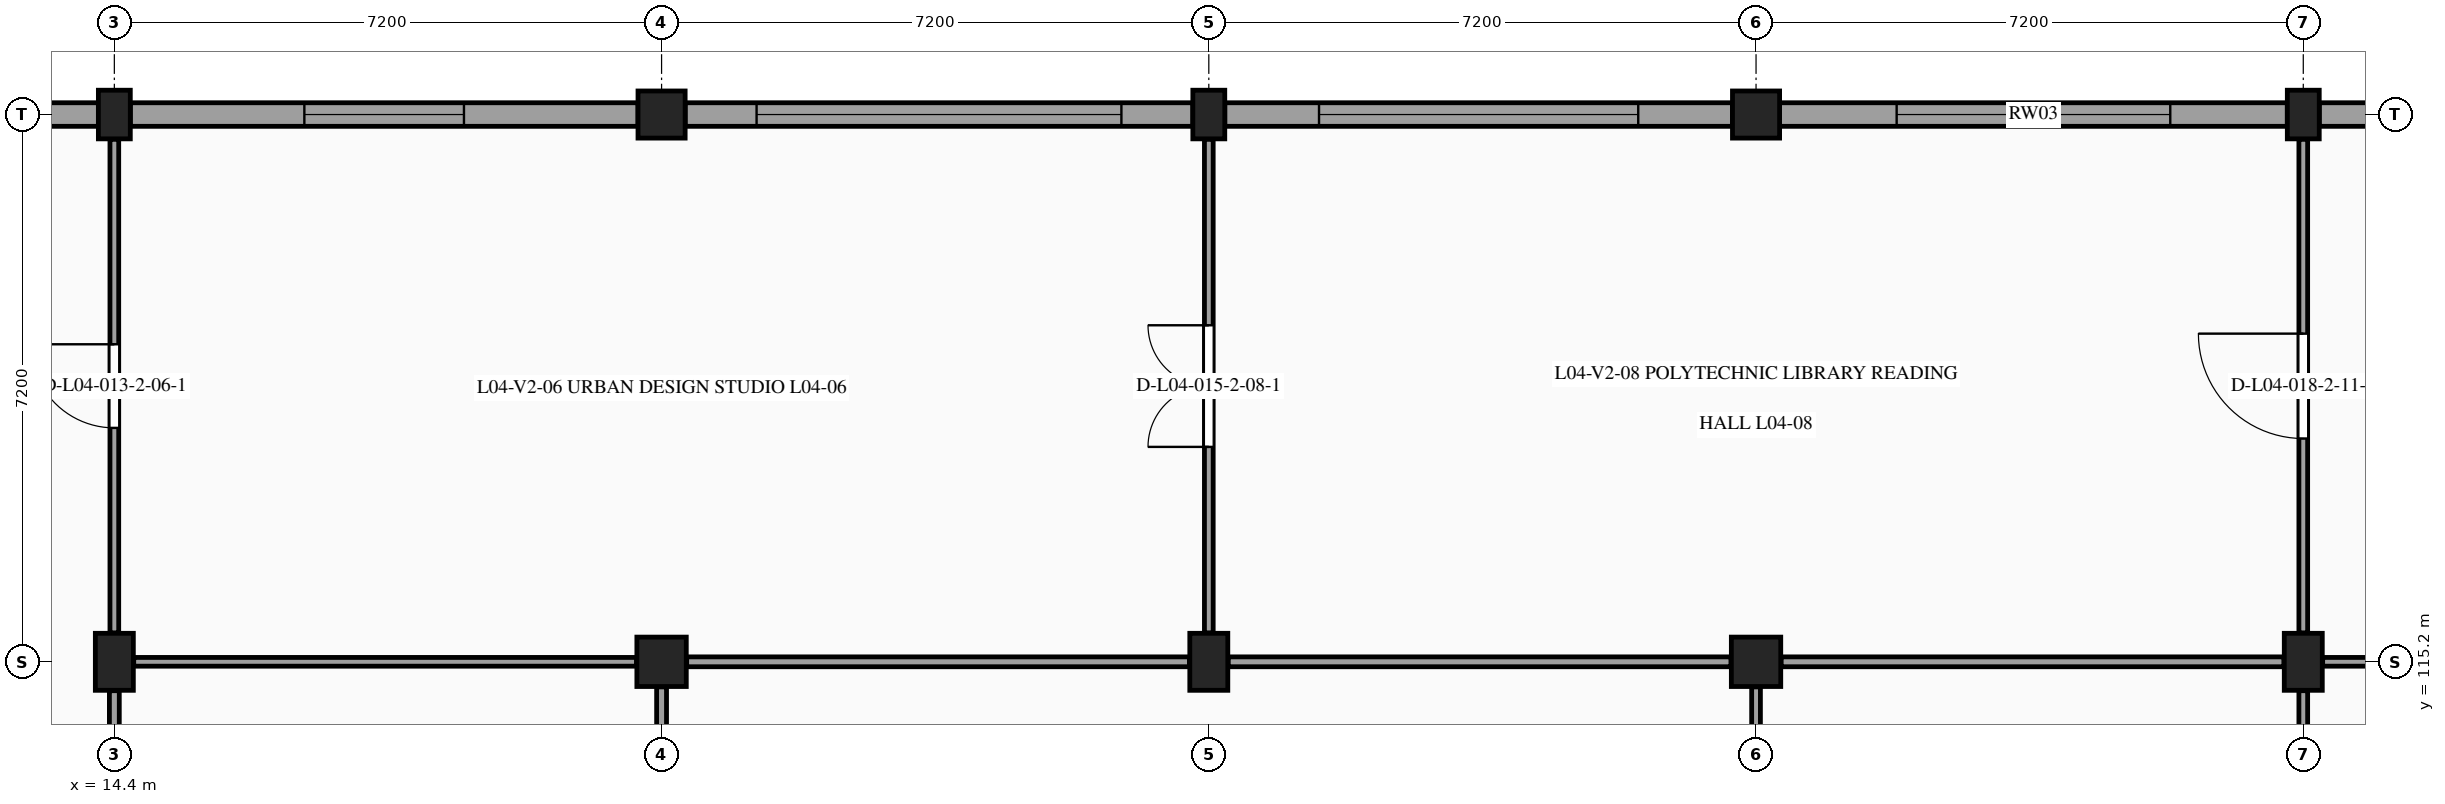
"""IFC4 building model, lengths in metres.
Left out: names, types, materials, properties, quantities, classifications, styles, units other than length and angle.
Written with IfcOpenShell. Run it as: python <this file> out.ifc"""

import sys

from ifc_helpers import new_model, si_unit, direction, frame, frame_2d, origin, origin_2d, place, context, subcontext, project, spatial, rectangle, extrude, element, fill, save


model = new_model("IFC4")
c1 = context("Model", 3, precision=1e-05, world=origin(), true_north=direction((0.0, 1.0)))
c2 = subcontext(c1, "Body", "Model", "MODEL_VIEW")
j1 = project(units=[si_unit("LENGTHUNIT", "METRE"), si_unit("PLANEANGLEUNIT", "RADIAN")], contexts=[c1])
p1 = place(None, origin())
s1 = spatial("IfcSite", under=j1, at=p1, CompositionType="ELEMENT")
p2 = place(p1, origin())
s2 = spatial("IfcBuilding", under=s1, at=p2, CompositionType="ELEMENT")
p3 = place(p2, frame((0.0, 0.0, 18.6)))
s3 = spatial("IfcBuildingStorey", under=s2, at=p3, CompositionType="ELEMENT", Elevation=18.6)
p4 = place(p3, frame((14.4, 115.2, 0.0), z_axis=(0.0, 0.0, 1.0), x_axis=(1.0, 0.0, 0.0)))
e1 = element("IfcColumn", 1, at=p4, inside=s3, PredefinedType="COLUMN", context=c2, shape_type="SweptSolid", body=[
    extrude(rectangle(XDim=0.5, YDim=0.75, at=origin_2d()), origin(), (0.0, 0.0, 1.0), 4.2),
])
p5 = place(p3, frame((14.4, 122.4, 0.0), z_axis=(0.0, 0.0, 1.0), x_axis=(1.0, 0.0, 0.0)))
e2 = element("IfcColumn", 2, at=p5, inside=s3, PredefinedType="PILASTER", context=c2, shape_type="SweptSolid", body=[
    extrude(rectangle(XDim=0.42, YDim=0.64, at=origin_2d()), origin(), (0.0, 0.0, 1.0), 4.2),
])
p6 = place(p3, frame((21.6, 115.2, 0.0), z_axis=(0.0, 0.0, 1.0), x_axis=(1.0, 0.0, 0.0)))
e3 = element("IfcColumn", 3, at=p6, inside=s3, PredefinedType="COLUMN", context=c2, shape_type="SweptSolid", body=[
    extrude(rectangle(XDim=0.65, YDim=0.65, at=origin_2d()), origin(), (0.0, 0.0, 1.0), 4.2),
])
p7 = place(p3, frame((21.6, 122.4, 0.0), z_axis=(0.0, 0.0, 1.0), x_axis=(1.0, 0.0, 0.0)))
e4 = element("IfcColumn", 4, at=p7, inside=s3, PredefinedType="COLUMN", context=c2, shape_type="SweptSolid", body=[
    extrude(rectangle(XDim=0.62, YDim=0.62, at=origin_2d()), origin(), (0.0, 0.0, 1.0), 4.2),
])
p8 = place(p3, frame((28.8, 115.2, 0.0), z_axis=(0.0, 0.0, 1.0), x_axis=(1.0, 0.0, 0.0)))
e5 = element("IfcColumn", 5, at=p8, inside=s3, PredefinedType="COLUMN", context=c2, shape_type="SweptSolid", body=[
    extrude(rectangle(XDim=0.5, YDim=0.75, at=origin_2d()), origin(), (0.0, 0.0, 1.0), 4.2),
])
p9 = place(p3, frame((28.8, 122.4, 0.0), z_axis=(0.0, 0.0, 1.0), x_axis=(1.0, 0.0, 0.0)))
e6 = element("IfcColumn", 6, at=p9, inside=s3, PredefinedType="PILASTER", context=c2, shape_type="SweptSolid", body=[
    extrude(rectangle(XDim=0.42, YDim=0.64, at=origin_2d()), origin(), (0.0, 0.0, 1.0), 4.2),
])
p10 = place(p3, frame((36.0, 115.2, 0.0), z_axis=(0.0, 0.0, 1.0), x_axis=(1.0, 0.0, 0.0)))
e7 = element("IfcColumn", 7, at=p10, inside=s3, PredefinedType="COLUMN", context=c2, shape_type="SweptSolid", body=[
    extrude(rectangle(XDim=0.65, YDim=0.65, at=origin_2d()), origin(), (0.0, 0.0, 1.0), 4.2),
])
p11 = place(p3, frame((36.0, 122.4, 0.0), z_axis=(0.0, 0.0, 1.0), x_axis=(1.0, 0.0, 0.0)))
e8 = element("IfcColumn", 8, at=p11, inside=s3, PredefinedType="COLUMN", context=c2, shape_type="SweptSolid", body=[
    extrude(rectangle(XDim=0.62, YDim=0.62, at=origin_2d()), origin(), (0.0, 0.0, 1.0), 4.2),
])
p12 = place(p3, frame((43.2, 115.2, 0.0), z_axis=(0.0, 0.0, 1.0), x_axis=(1.0, 0.0, 0.0)))
e9 = element("IfcColumn", 9, at=p12, inside=s3, PredefinedType="COLUMN", context=c2, shape_type="SweptSolid", body=[
    extrude(rectangle(XDim=0.5, YDim=0.75, at=origin_2d()), origin(), (0.0, 0.0, 1.0), 4.2),
])
p13 = place(p3, frame((43.2, 122.4, 0.0), z_axis=(0.0, 0.0, 1.0), x_axis=(1.0, 0.0, 0.0)))
e10 = element("IfcColumn", 10, at=p13, inside=s3, PredefinedType="PILASTER", context=c2, shape_type="SweptSolid", body=[
    extrude(rectangle(XDim=0.42, YDim=0.64, at=origin_2d()), origin(), (0.0, 0.0, 1.0), 4.2),
])
p14 = place(p3, frame((7.51, 122.4, 0.0), z_axis=(0.0, 0.0, 1.0), x_axis=(1.0, 0.0, 0.0)))
e11 = element("IfcWall", 11, at=p14, inside=s3, PredefinedType="STANDARD", context=c2, shape_type="SweptSolid", body=[
    extrude(rectangle(XDim=6.68, YDim=0.31, at=frame_2d((3.34, 0.0))), origin(), (0.0, 0.0, 1.0), 3.2),
])
p15 = place(p14, frame((2.09, 0.0, 0.98)))
e12 = element("IfcOpeningElement", 12, at=p15, cuts=e11, PredefinedType="OPENING", context=c2, shape_type="SweptSolid", body=[
    extrude(rectangle(XDim=2.5, YDim=1.35, at=frame_2d((1.25, 0.675))), frame((0.0, 0.165, 0.0), z_axis=(0.0, -1.0, 0.0), x_axis=(1.0, 0.0, 0.0)), (0.0, 0.0, 1.0), 0.33),
])
p16 = place(p3, frame((14.61, 122.4, 0.0), z_axis=(0.0, 0.0, 1.0), x_axis=(1.0, 0.0, 0.0)))
e13 = element("IfcWall", 13, at=p16, inside=s3, PredefinedType="STANDARD", context=c2, shape_type="SweptSolid", body=[
    extrude(rectangle(XDim=6.68, YDim=0.31, at=frame_2d((3.34, 0.0))), origin(), (0.0, 0.0, 1.0), 3.2),
])
p17 = place(p16, frame((2.29, 0.0, 0.98)))
e14 = element("IfcOpeningElement", 14, at=p17, cuts=e13, PredefinedType="OPENING", context=c2, shape_type="SweptSolid", body=[
    extrude(rectangle(XDim=2.1, YDim=1.3, at=frame_2d((1.05, 0.65))), frame((0.0, 0.165, 0.0), z_axis=(0.0, -1.0, 0.0), x_axis=(1.0, 0.0, 0.0)), (0.0, 0.0, 1.0), 0.33),
])
p18 = place(p3, frame((21.91, 122.4, 0.0), z_axis=(0.0, 0.0, 1.0), x_axis=(1.0, 0.0, 0.0)))
e15 = element("IfcWall", 15, at=p18, inside=s3, PredefinedType="STANDARD", context=c2, shape_type="SweptSolid", body=[
    extrude(rectangle(XDim=6.68, YDim=0.31, at=frame_2d((3.34, 0.0))), origin(), (0.0, 0.0, 1.0), 3.2),
])
p19 = place(p18, frame((0.94, 0.0, 0.98)))
e16 = element("IfcOpeningElement", 16, at=p19, cuts=e15, PredefinedType="OPENING", context=c2, shape_type="SweptSolid", body=[
    extrude(rectangle(XDim=4.8, YDim=1.5, at=frame_2d((2.4, 0.75))), frame((0.0, 0.165, 0.0), z_axis=(0.0, -1.0, 0.0), x_axis=(1.0, 0.0, 0.0)), (0.0, 0.0, 1.0), 0.33),
])
p20 = place(p3, frame((29.01, 122.4, 0.0), z_axis=(0.0, 0.0, 1.0), x_axis=(1.0, 0.0, 0.0)))
e17 = element("IfcWall", 17, at=p20, inside=s3, PredefinedType="STANDARD", context=c2, shape_type="SweptSolid", body=[
    extrude(rectangle(XDim=6.68, YDim=0.31, at=frame_2d((3.34, 0.0))), origin(), (0.0, 0.0, 1.0), 3.2),
])
p21 = place(p20, frame((1.24, 0.0, 0.98)))
e18 = element("IfcOpeningElement", 18, at=p21, cuts=e17, PredefinedType="OPENING", context=c2, shape_type="SweptSolid", body=[
    extrude(rectangle(XDim=4.2, YDim=1.5, at=frame_2d((2.1, 0.75))), frame((0.0, 0.165, 0.0), z_axis=(0.0, -1.0, 0.0), x_axis=(1.0, 0.0, 0.0)), (0.0, 0.0, 1.0), 0.33),
])
p22 = place(p3, frame((36.31, 122.4, 0.0), z_axis=(0.0, 0.0, 1.0), x_axis=(1.0, 0.0, 0.0)))
e19 = element("IfcWall", 19, at=p22, inside=s3, PredefinedType="STANDARD", context=c2, shape_type="SweptSolid", body=[
    extrude(rectangle(XDim=6.68, YDim=0.31, at=frame_2d((3.34, 0.0))), origin(), (0.0, 0.0, 1.0), 3.2),
])
p23 = place(p22, frame((1.54, 0.0, 0.98)))
e20 = element("IfcOpeningElement", 20, at=p23, cuts=e19, PredefinedType="OPENING", context=c2, shape_type="SweptSolid", body=[
    extrude(rectangle(XDim=3.6, YDim=1.5, at=frame_2d((1.8, 0.75))), frame((0.0, 0.165, 0.0), z_axis=(0.0, -1.0, 0.0), x_axis=(1.0, 0.0, 0.0)), (0.0, 0.0, 1.0), 0.33),
])
p24 = place(p3, frame((43.41, 122.4, 0.0), z_axis=(0.0, 0.0, 1.0), x_axis=(1.0, 0.0, 0.0)))
e21 = element("IfcWall", 21, at=p24, inside=s3, PredefinedType="STANDARD", context=c2, shape_type="SweptSolid", body=[
    extrude(rectangle(XDim=6.68, YDim=0.31, at=frame_2d((3.34, 0.0))), origin(), (0.0, 0.0, 1.0), 3.2),
])
p25 = place(p24, frame((1.74, 0.0, 0.98)))
e22 = element("IfcOpeningElement", 22, at=p25, cuts=e21, PredefinedType="OPENING", context=c2, shape_type="SweptSolid", body=[
    extrude(rectangle(XDim=3.2, YDim=1.45, at=frame_2d((1.6, 0.725))), frame((0.0, 0.165, 0.0), z_axis=(0.0, -1.0, 0.0), x_axis=(1.0, 0.0, 0.0)), (0.0, 0.0, 1.0), 0.33),
])
p26 = place(p3, frame((14.4, 108.305, 0.0), z_axis=(0.0, 0.0, 1.0), x_axis=(0.0, 1.0, 0.0)))
e23 = element("IfcWall", 23, at=p26, inside=s3, PredefinedType="PARTITIONING", context=c2, shape_type="SweptSolid", body=[
    extrude(rectangle(XDim=6.515, YDim=0.13, at=frame_2d((3.258, 0.0))), origin(), (0.0, 0.0, 1.0), 3.26),
])
p27 = place(p3, frame((14.4, 115.58, 0.0), z_axis=(0.0, 0.0, 1.0), x_axis=(0.0, 1.0, 0.0)))
e24 = element("IfcWall", 24, at=p27, inside=s3, PredefinedType="PARTITIONING", context=c2, shape_type="SweptSolid", body=[
    extrude(rectangle(XDim=6.495, YDim=0.115, at=frame_2d((3.248, 0.0))), origin(), (0.0, 0.0, 1.0), 3.325),
])
p28 = place(p27, frame((2.698, 0.0, 0.0)))
e25 = element("IfcOpeningElement", 25, at=p28, cuts=e24, PredefinedType="OPENING", context=c2, shape_type="SweptSolid", body=[
    extrude(rectangle(XDim=1.1, YDim=2.15, at=frame_2d((0.55, 1.075))), frame((0.0, 0.067, 0.0), z_axis=(0.0, -1.0, 0.0), x_axis=(1.0, 0.0, 0.0)), (0.0, 0.0, 1.0), 0.135),
])
p29 = place(p3, frame((21.6, 108.345, 0.0), z_axis=(0.0, 0.0, 1.0), x_axis=(0.0, 1.0, 0.0)))
e26 = element("IfcWall", 26, at=p29, inside=s3, PredefinedType="PARTITIONING", context=c2, shape_type="SweptSolid", body=[
    extrude(rectangle(XDim=6.525, YDim=0.13, at=frame_2d((3.263, 0.0))), origin(), (0.0, 0.0, 1.0), 3.26),
])
p30 = place(p29, frame((2.462, 0.0, 0.0)))
e27 = element("IfcOpeningElement", 27, at=p30, cuts=e26, PredefinedType="OPENING", context=c2, shape_type="SweptSolid", body=[
    extrude(rectangle(XDim=1.6, YDim=2.2, at=frame_2d((0.8, 1.1))), frame((0.0, 0.075, 0.0), z_axis=(0.0, -1.0, 0.0), x_axis=(1.0, 0.0, 0.0)), (0.0, 0.0, 1.0), 0.15),
])
p31 = place(p3, frame((14.655, 115.2, 0.0), z_axis=(0.0, 0.0, 1.0), x_axis=(1.0, 0.0, 0.0)))
e28 = element("IfcWall", 28, at=p31, inside=s3, PredefinedType="PARTITIONING", context=c2, shape_type="SweptSolid", body=[
    extrude(rectangle(XDim=6.615, YDim=0.115, at=frame_2d((3.308, 0.0))), origin(), (0.0, 0.0, 1.0), 3.295),
])
p32 = place(p3, frame((21.93, 115.2, 0.0), z_axis=(0.0, 0.0, 1.0), x_axis=(1.0, 0.0, 0.0)))
e29 = element("IfcWall", 29, at=p32, inside=s3, PredefinedType="PARTITIONING", context=c2, shape_type="SweptSolid", body=[
    extrude(rectangle(XDim=6.615, YDim=0.13, at=frame_2d((3.308, 0.0))), origin(), (0.0, 0.0, 1.0), 3.305),
])
p33 = place(p3, frame((28.8, 115.58, 0.0), z_axis=(0.0, 0.0, 1.0), x_axis=(0.0, 1.0, 0.0)))
e30 = element("IfcWall", 30, at=p33, inside=s3, PredefinedType="PARTITIONING", context=c2, shape_type="SweptSolid", body=[
    extrude(rectangle(XDim=6.495, YDim=0.115, at=frame_2d((3.248, 0.0))), origin(), (0.0, 0.0, 1.0), 3.325),
])
p34 = place(p33, frame((2.448, 0.0, 0.0)))
e31 = element("IfcOpeningElement", 31, at=p34, cuts=e30, PredefinedType="OPENING", context=c2, shape_type="SweptSolid", body=[
    extrude(rectangle(XDim=1.6, YDim=2.2, at=frame_2d((0.8, 1.1))), frame((0.0, 0.067, 0.0), z_axis=(0.0, -1.0, 0.0), x_axis=(1.0, 0.0, 0.0)), (0.0, 0.0, 1.0), 0.135),
])
p35 = place(p3, frame((36.0, 108.345, 0.0), z_axis=(0.0, 0.0, 1.0), x_axis=(0.0, 1.0, 0.0)))
e32 = element("IfcWall", 32, at=p35, inside=s3, PredefinedType="PARTITIONING", context=c2, shape_type="SweptSolid", body=[
    extrude(rectangle(XDim=6.525, YDim=0.115, at=frame_2d((3.263, 0.0))), origin(), (0.0, 0.0, 1.0), 3.26),
])
p36 = place(p35, frame((2.462, 0.0, 0.0)))
e33 = element("IfcOpeningElement", 33, at=p36, cuts=e32, PredefinedType="OPENING", context=c2, shape_type="SweptSolid", body=[
    extrude(rectangle(XDim=1.6, YDim=2.2, at=frame_2d((0.8, 1.1))), frame((0.0, 0.067, 0.0), z_axis=(0.0, -1.0, 0.0), x_axis=(1.0, 0.0, 0.0)), (0.0, 0.0, 1.0), 0.135),
])
p37 = place(p3, frame((29.055, 115.2, 0.0), z_axis=(0.0, 0.0, 1.0), x_axis=(1.0, 0.0, 0.0)))
e34 = element("IfcWall", 34, at=p37, inside=s3, PredefinedType="PARTITIONING", context=c2, shape_type="SweptSolid", body=[
    extrude(rectangle(XDim=6.615, YDim=0.13, at=frame_2d((3.308, 0.0))), origin(), (0.0, 0.0, 1.0), 3.315),
])
p38 = place(p3, frame((43.2, 108.305, 0.0), z_axis=(0.0, 0.0, 1.0), x_axis=(0.0, 1.0, 0.0)))
e35 = element("IfcWall", 35, at=p38, inside=s3, PredefinedType="PARTITIONING", context=c2, shape_type="SweptSolid", body=[
    extrude(rectangle(XDim=6.515, YDim=0.115, at=frame_2d((3.258, 0.0))), origin(), (0.0, 0.0, 1.0), 3.26),
])
p39 = place(p3, frame((36.33, 115.2, 0.0), z_axis=(0.0, 0.0, 1.0), x_axis=(1.0, 0.0, 0.0)))
e36 = element("IfcWall", 36, at=p39, inside=s3, PredefinedType="PARTITIONING", context=c2, shape_type="SweptSolid", body=[
    extrude(rectangle(XDim=6.615, YDim=0.13, at=frame_2d((3.308, 0.0))), origin(), (0.0, 0.0, 1.0), 3.155),
])
p40 = place(p3, frame((43.2, 115.58, 0.0), z_axis=(0.0, 0.0, 1.0), x_axis=(0.0, 1.0, 0.0)))
e37 = element("IfcWall", 37, at=p40, inside=s3, PredefinedType="PARTITIONING", context=c2, shape_type="SweptSolid", body=[
    extrude(rectangle(XDim=6.495, YDim=0.115, at=frame_2d((3.248, 0.0))), origin(), (0.0, 0.0, 1.0), 3.325),
])
p41 = place(p40, frame((2.558, 0.0, 0.0)))
e38 = element("IfcOpeningElement", 38, at=p41, cuts=e37, PredefinedType="OPENING", context=c2, shape_type="SweptSolid", body=[
    extrude(rectangle(XDim=1.38, YDim=2.22, at=frame_2d((0.69, 1.11))), frame((0.0, 0.067, 0.0), z_axis=(0.0, -1.0, 0.0), x_axis=(1.0, 0.0, 0.0)), (0.0, 0.0, 1.0), 0.135),
])
p42 = place(p3, frame((43.455, 115.2, 0.0), z_axis=(0.0, 0.0, 1.0), x_axis=(1.0, 0.0, 0.0)))
e39 = element("IfcWall", 39, at=p42, inside=s3, PredefinedType="PARTITIONING", context=c2, shape_type="SweptSolid", body=[
    extrude(rectangle(XDim=6.615, YDim=0.115, at=frame_2d((3.308, 0.0))), origin(), (0.0, 0.0, 1.0), 3.175),
])
p43 = place(p17, origin())
e40 = element("IfcWindow", 40, at=p43, inside=s3, PartitioningType="SINGLE_PANEL", PredefinedType="WINDOW", context=c2, shape_type="SweptSolid", body=[
    extrude(rectangle(XDim=2.1, YDim=1.3, at=frame_2d((1.05, 0.65))), frame((0.0, -0.03, 0.0), z_axis=(0.0, -1.0, 0.0), x_axis=(1.0, 0.0, 0.0)), (0.0, 0.0, 1.0), 0.06),
])
fill(e14, e40)
p44 = place(p19, origin())
e41 = element("IfcWindow", 41, at=p44, inside=s3, PartitioningType="SINGLE_PANEL", PredefinedType="WINDOW", context=c2, shape_type="SweptSolid", body=[
    extrude(rectangle(XDim=4.8, YDim=1.5, at=frame_2d((2.4, 0.75))), frame((0.0, -0.03, 0.0), z_axis=(0.0, -1.0, 0.0), x_axis=(1.0, 0.0, 0.0)), (0.0, 0.0, 1.0), 0.06),
])
fill(e16, e41)
p45 = place(p21, origin())
e42 = element("IfcWindow", 42, at=p45, inside=s3, PartitioningType="SINGLE_PANEL", PredefinedType="WINDOW", context=c2, shape_type="SweptSolid", body=[
    extrude(rectangle(XDim=4.2, YDim=1.5, at=frame_2d((2.1, 0.75))), frame((0.0, -0.03, 0.0), z_axis=(0.0, -1.0, 0.0), x_axis=(1.0, 0.0, 0.0)), (0.0, 0.0, 1.0), 0.06),
])
fill(e18, e42)
p46 = place(p23, origin())
e43 = element("IfcWindow", 43, at=p46, inside=s3, PartitioningType="SINGLE_PANEL", PredefinedType="WINDOW", context=c2, shape_type="SweptSolid", body=[
    extrude(rectangle(XDim=3.6, YDim=1.5, at=frame_2d((1.8, 0.75))), frame((0.0, -0.03, 0.0), z_axis=(0.0, -1.0, 0.0), x_axis=(1.0, 0.0, 0.0)), (0.0, 0.0, 1.0), 0.06),
])
fill(e20, e43)
p47 = place(p28, origin())
e44 = element("IfcDoor", 44, at=p47, inside=s3, OperationType="SINGLE_SWING_RIGHT", PredefinedType="DOOR", context=c2, shape_type="SweptSolid", body=[
    extrude(rectangle(XDim=1.1, YDim=2.15, at=frame_2d((0.55, 1.075))), frame((0.0, 0.025, 0.0), z_axis=(0.0, -1.0, 0.0), x_axis=(1.0, 0.0, 0.0)), (0.0, 0.0, 1.0), 0.05),
])
fill(e25, e44)
p48 = place(p34, origin())
e45 = element("IfcDoor", 45, at=p48, inside=s3, OperationType="DOUBLE_DOOR_SINGLE_SWING", PredefinedType="DOOR", context=c2, shape_type="SweptSolid", body=[
    extrude(rectangle(XDim=1.6, YDim=2.2, at=frame_2d((0.8, 1.1))), frame((0.0, 0.025, 0.0), z_axis=(0.0, -1.0, 0.0), x_axis=(1.0, 0.0, 0.0)), (0.0, 0.0, 1.0), 0.05),
])
fill(e31, e45)
p49 = place(p41, origin())
e46 = element("IfcDoor", 46, at=p49, inside=s3, OperationType="SINGLE_SWING_RIGHT", PredefinedType="DOOR", context=c2, shape_type="SweptSolid", body=[
    extrude(rectangle(XDim=1.38, YDim=2.22, at=frame_2d((0.69, 1.11))), frame((0.0, 0.025, 0.0), z_axis=(0.0, -1.0, 0.0), x_axis=(1.0, 0.0, 0.0)), (0.0, 0.0, 1.0), 0.05),
])
fill(e38, e46)
save(model, sys.argv[1])
